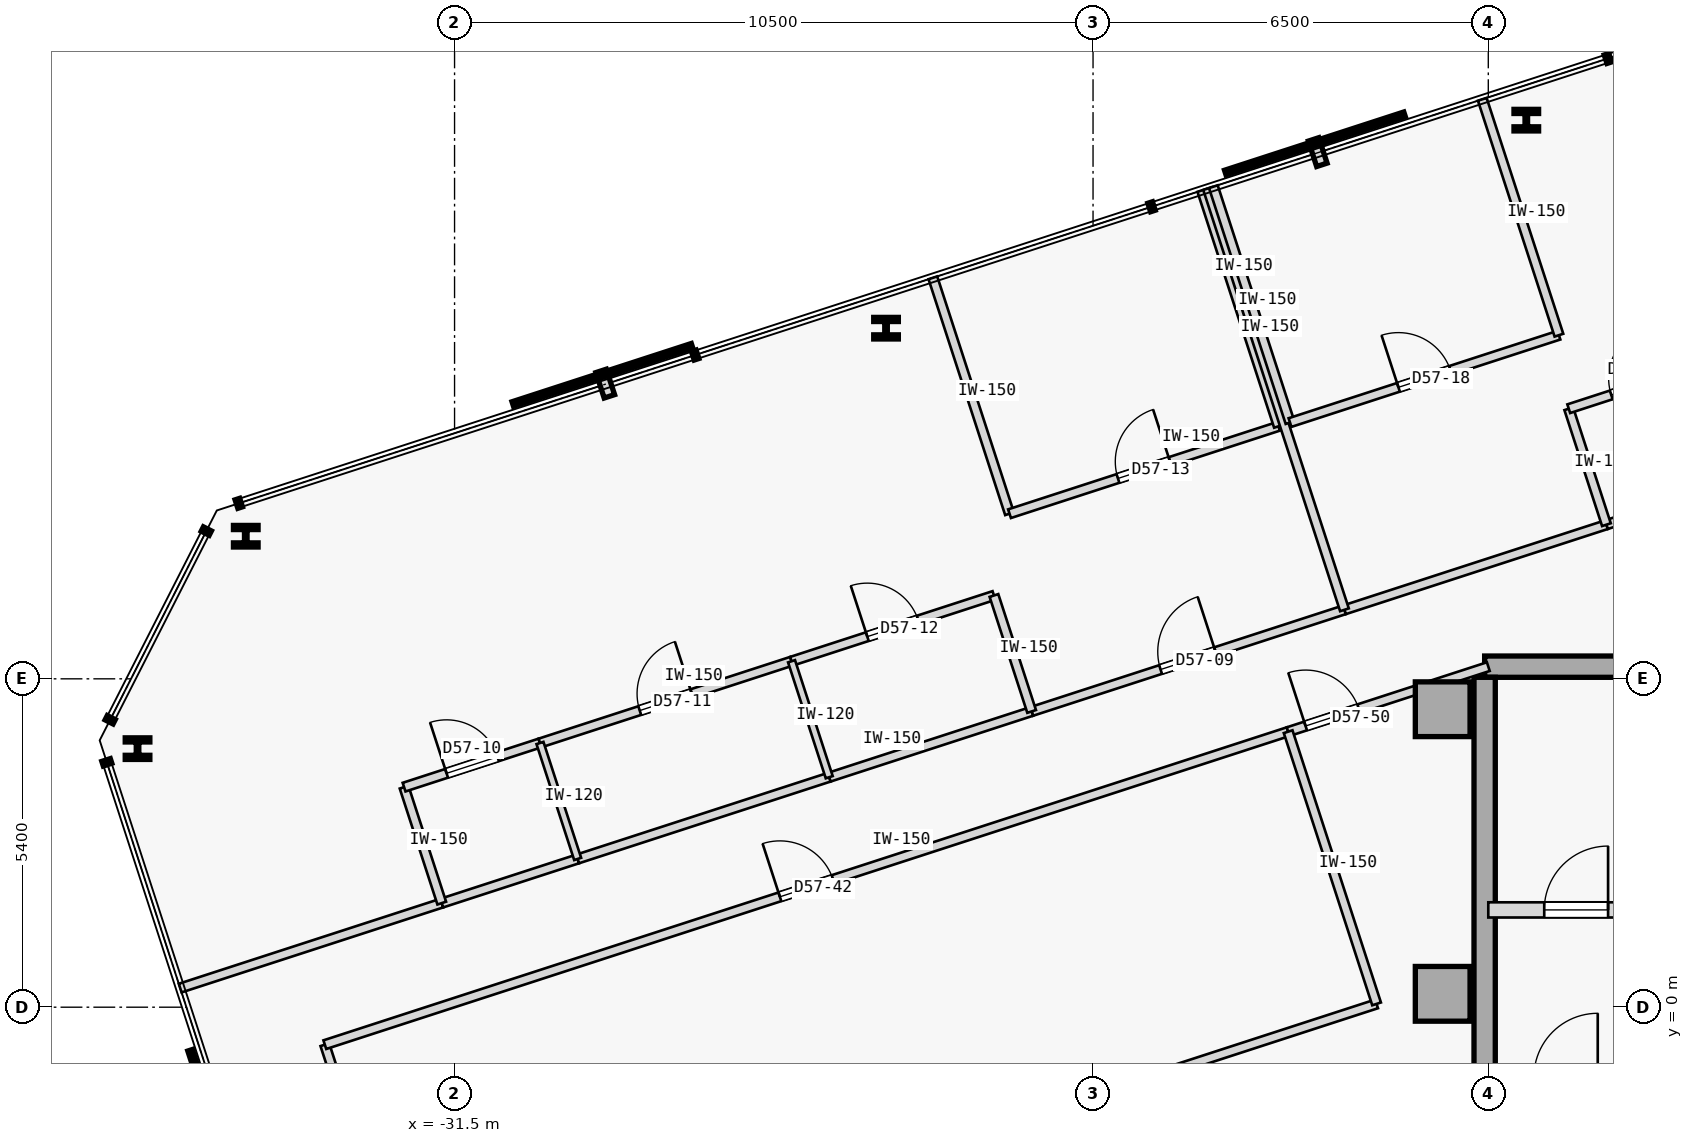
"""IFC4 building model, lengths in metres.
Left out: names, types, materials, properties, quantities, classifications, styles, units other than length and angle.
Written with IfcOpenShell. Run it as: python <this file> out.ifc"""

import sys

from ifc_helpers import new_model, si_unit, direction, frame, frame_2d, origin, origin_2d, place, context, subcontext, project, spatial, rectangle, i_section, extrude, element, fill, save


model = new_model("IFC4")
c1 = context("Model", 3, precision=1e-05, world=origin(), true_north=direction((0.0, 1.0)))
c2 = subcontext(c1, "Body", "Model", "MODEL_VIEW")
j1 = project(units=[si_unit("LENGTHUNIT", "METRE"), si_unit("PLANEANGLEUNIT", "RADIAN")], contexts=[c1])
p1 = place(None, origin())
s1 = spatial("IfcSite", under=j1, at=p1, CompositionType="ELEMENT")
p2 = place(p1, origin())
s2 = spatial("IfcBuilding", under=s1, at=p2, CompositionType="ELEMENT")
p3 = place(p2, frame((0.0, 0.0, 217.6)))
s3 = spatial("IfcBuildingStorey", under=s2, at=p3, CompositionType="ELEMENT", Elevation=217.6)
for number, where, z_axis, x_axis in (
    (1, (-15.25, 4.9, 0.0), (0.0, 0.0, 1.0), (1.0, 0.0, 0.0)),
    (2, (-15.25, 0.22, 0.0), (0.0, 0.0, 1.0), (1.0, 0.0, 0.0)),
):
    element("IfcColumn", number, at=place(p3, frame(where, z_axis=z_axis, x_axis=x_axis)), inside=s3, PredefinedType="COLUMN", context=c2, shape_type="SweptSolid", body=[
        extrude(rectangle(XDim=0.9, YDim=0.9, at=origin_2d()), origin(), (0.0, 0.0, 1.0), 3.35),
    ])
p4 = place(p3, frame((-14.56, 5.6, 0.0), z_axis=(0.0, 0.0, 1.0), x_axis=(1.0, 0.0, 0.0)))
e3 = element("IfcWall", 3, at=p4, inside=s3, PredefinedType="SHEAR", context=c2, shape_type="SweptSolid", body=[
    extrude(rectangle(XDim=11.41, YDim=0.35, at=frame_2d((5.705, 0.0))), origin(), (0.0, 0.0, 1.0), 3.125),
])
p5 = place(p3, frame((-14.56, -5.425, 0.0), z_axis=(0.0, 0.0, 1.0), x_axis=(0.0, 1.0, 0.0)))
e4 = element("IfcWall", 4, at=p5, inside=s3, PredefinedType="SHEAR", context=c2, shape_type="SweptSolid", body=[
    extrude(rectangle(XDim=10.85, YDim=0.35, at=frame_2d((5.425, 0.0))), origin(), (0.0, 0.0, 1.0), 3.125),
])
for number, where, z_axis, x_axis in (
    (5, (-13.875, 14.587, 0.0), (0.0, 0.0, 1.0), (1.0, 0.0, 0.0)),
    (6, (-24.404, 11.166, 0.0), (0.0, 0.0, 1.0), (1.0, 0.0, 0.0)),
    (7, (-34.934, 7.745, 0.0), (0.0, 0.0, 1.0), (1.0, 0.0, 0.0)),
    (8, (-36.713, 4.252, 0.0), (0.0, 0.0, 1.0), (1.0, 0.0, 0.0)),
):
    element("IfcColumn", number, at=place(p3, frame(where, z_axis=z_axis, x_axis=x_axis)), inside=s3, PredefinedType="COLUMN", context=c2, shape_type="SweptSolid", body=[
        extrude(i_section(OverallWidth=0.405, OverallDepth=0.355, WebThickness=0.042, FlangeThickness=0.068, FilletRadius=0.015, at=origin_2d()), origin(), (0.0, 0.0, 1.0), 3.35),
    ])
p6 = place(p3, frame((-14.5, 1.6, 0.0), z_axis=(0.0, 0.0, 1.0), x_axis=(1.0, 0.0, 0.0)))
e9 = element("IfcWall", 9, at=p6, inside=s3, PredefinedType="STANDARD", context=c2, shape_type="SweptSolid", body=[
    extrude(rectangle(XDim=3.6, YDim=0.25, at=frame_2d((1.8, 0.0))), origin(), (0.0, 0.0, 1.0), 3.125),
])
p7 = place(p6, frame((0.92, 0.0, 0.0)))
e10 = element("IfcOpeningElement", 10, at=p7, cuts=e9, PredefinedType="OPENING", context=c2, shape_type="SweptSolid", body=[
    extrude(rectangle(XDim=1.05, YDim=2.15, at=frame_2d((0.525, 1.075))), frame((0.0, 0.135, 0.0), z_axis=(0.0, -1.0, 0.0), x_axis=(1.0, 0.0, 0.0)), (0.0, 0.0, 1.0), 0.27),
])
p8 = place(p3, frame((-36.012, 0.314, 0.0), z_axis=(0.0, 0.0, 1.0), x_axis=(0.951052710898, 0.309028705936, 0.0)))
e11 = element("IfcWall", 11, at=p8, inside=s3, PredefinedType="PARTITIONING", context=c2, shape_type="SweptSolid", body=[
    extrude(rectangle(XDim=4.523, YDim=0.15, at=frame_2d((2.261, 0.0))), origin(), (0.0, 0.0, 1.0), 3.125),
])
p9 = place(p3, frame((-22.01, 4.864, 0.0), z_axis=(0.0, 0.0, 1.0), x_axis=(0.951061595649, 0.309001361293, 0.0)))
e12 = element("IfcWall", 12, at=p9, inside=s3, PredefinedType="PARTITIONING", context=c2, shape_type="SweptSolid", body=[
    extrude(rectangle(XDim=5.409, YDim=0.15, at=frame_2d((2.705, 0.0))), origin(), (0.0, 0.0, 1.0), 3.125),
])
p10 = place(p9, frame((2.229, 0.0, 0.0)))
e13 = element("IfcOpeningElement", 13, at=p10, cuts=e12, PredefinedType="OPENING", context=c2, shape_type="SweptSolid", body=[
    extrude(rectangle(XDim=0.95, YDim=2.15, at=frame_2d((0.475, 1.075))), frame((0.0, 0.085, 0.0), z_axis=(0.0, -1.0, 0.0), x_axis=(1.0, 0.0, 0.0)), (0.0, 0.0, 1.0), 0.17),
])
p11 = place(p3, frame((-31.711, 1.712, 0.0), z_axis=(0.0, 0.0, 1.0), x_axis=(0.951076048914, 0.308956872689, 0.0)))
e14 = element("IfcWall", 14, at=p11, inside=s3, PredefinedType="PARTITIONING", context=c2, shape_type="SweptSolid", body=[
    extrude(rectangle(XDim=2.35, YDim=0.15, at=frame_2d((1.175, 0.0))), origin(), (0.0, 0.0, 1.0), 3.125),
])
p12 = place(p3, frame((-29.476, 2.438, 0.0), z_axis=(0.0, 0.0, 1.0), x_axis=(0.951057987102, 0.309012467661, 0.0)))
e15 = element("IfcWall", 15, at=p12, inside=s3, PredefinedType="PARTITIONING", context=c2, shape_type="SweptSolid", body=[
    extrude(rectangle(XDim=4.35, YDim=0.15, at=frame_2d((2.175, 0.0))), origin(), (0.0, 0.0, 1.0), 3.125),
])
p13 = place(p3, frame((-25.338, 3.782, 0.0), z_axis=(0.0, 0.0, 1.0), x_axis=(0.951055596592, 0.309019824916, 0.0)))
e16 = element("IfcWall", 16, at=p13, inside=s3, PredefinedType="PARTITIONING", context=c2, shape_type="SweptSolid", body=[
    extrude(rectangle(XDim=3.5, YDim=0.15, at=frame_2d((1.75, 0.0))), origin(), (0.0, 0.0, 1.0), 3.125),
])
p14 = place(p3, frame((-16.865, 6.535, 0.0), z_axis=(0.0, 0.0, 1.0), x_axis=(0.951049118272, 0.309039762222, 0.0)))
e17 = element("IfcWall", 17, at=p14, inside=s3, PredefinedType="PARTITIONING", context=c2, shape_type="SweptSolid", body=[
    extrude(rectangle(XDim=4.53, YDim=0.15, at=frame_2d((2.265, 0.0))), origin(), (0.0, 0.0, 1.0), 3.125),
])
p15 = place(p3, frame((-12.557, 7.935, 0.0), z_axis=(0.0, 0.0, 1.0), x_axis=(0.951045519245, 0.309050837767, 0.0)))
e18 = element("IfcWall", 18, at=p15, inside=s3, PredefinedType="PARTITIONING", context=c2, shape_type="SweptSolid", body=[
    extrude(rectangle(XDim=2.35, YDim=0.15, at=frame_2d((1.175, 0.0))), origin(), (0.0, 0.0, 1.0), 3.125),
])
p16 = place(p3, frame((-32.179, -5.093, 0.0), z_axis=(0.0, 0.0, 1.0), x_axis=(-0.309014532869, 0.951057316083, 0.0)))
e19 = element("IfcWall", 19, at=p16, inside=s3, PredefinedType="PARTITIONING", context=c2, shape_type="SweptSolid", body=[
    extrude(rectangle(XDim=4.707, YDim=0.15, at=frame_2d((2.354, 0.0))), origin(), (0.0, 0.0, 1.0), 3.125),
])
p17 = place(p3, frame((-33.633, -0.616, 0.0), z_axis=(0.0, 0.0, 1.0), x_axis=(0.951058192995, 0.309011833974, 0.0)))
e20 = element("IfcWall", 20, at=p17, inside=s3, PredefinedType="PARTITIONING", context=c2, shape_type="SweptSolid", body=[
    extrude(rectangle(XDim=16.657, YDim=0.15, at=frame_2d((8.329, 0.0))), origin(), (0.0, 0.0, 1.0), 3.125),
])
p18 = place(p17, frame((7.868, 0.0, 0.0)))
e21 = element("IfcOpeningElement", 21, at=p18, cuts=e20, PredefinedType="OPENING", context=c2, shape_type="SweptSolid", body=[
    extrude(rectangle(XDim=0.92, YDim=2.15, at=frame_2d((0.46, 1.075))), frame((0.0, 0.085, 0.0), z_axis=(0.0, -1.0, 0.0), x_axis=(1.0, 0.0, 0.0)), (0.0, 0.0, 1.0), 0.17),
])
p19 = place(p3, frame((-17.792, 4.531, 0.0), z_axis=(0.0, 0.0, 1.0), x_axis=(0.951047546178, 0.309044600193, 0.0)))
e22 = element("IfcWall", 22, at=p19, inside=s3, PredefinedType="PARTITIONING", context=c2, shape_type="SweptSolid", body=[
    extrude(rectangle(XDim=3.461, YDim=0.15, at=frame_2d((1.73, 0.0))), origin(), (0.0, 0.0, 1.0), 3.125),
])
p20 = place(p19, frame((0.302, 0.0, 0.0)))
e23 = element("IfcOpeningElement", 23, at=p20, cuts=e22, PredefinedType="OPENING", context=c2, shape_type="SweptSolid", body=[
    extrude(rectangle(XDim=0.92, YDim=2.15, at=frame_2d((0.46, 1.075))), frame((0.0, 0.085, 0.0), z_axis=(0.0, -1.0, 0.0), x_axis=(1.0, 0.0, 0.0)), (0.0, 0.0, 1.0), 0.17),
])
p21 = place(p3, frame((-31.711, 1.712, 0.0), z_axis=(0.0, 0.0, 1.0), x_axis=(-0.308948390121, 0.951078804433, 0.0)))
e24 = element("IfcWall", 24, at=p21, inside=s3, PredefinedType="PARTITIONING", context=c2, shape_type="SweptSolid", body=[
    extrude(rectangle(XDim=2.005, YDim=0.15, at=frame_2d((1.002, 0.0))), origin(), (0.0, 0.0, 1.0), 3.125),
])
p22 = place(p3, frame((-32.33, 3.619, 0.0), z_axis=(0.0, 0.0, 1.0), x_axis=(0.951066131077, 0.308987401554, 0.0)))
e25 = element("IfcWall", 25, at=p22, inside=s3, PredefinedType="PARTITIONING", context=c2, shape_type="SweptSolid", body=[
    extrude(rectangle(XDim=2.35, YDim=0.15, at=frame_2d((1.175, 0.0))), origin(), (0.0, 0.0, 1.0), 3.125),
])
p23 = place(p22, frame((0.735, 0.0, 0.0)))
e26 = element("IfcOpeningElement", 26, at=p23, cuts=e25, PredefinedType="OPENING", context=c2, shape_type="SweptSolid", body=[
    extrude(rectangle(XDim=0.88, YDim=2.15, at=frame_2d((0.44, 1.075))), frame((0.0, 0.085, 0.0), z_axis=(0.0, -1.0, 0.0), x_axis=(1.0, 0.0, 0.0)), (0.0, 0.0, 1.0), 0.17),
])
p24 = place(p3, frame((-30.095, 4.345, 0.0), z_axis=(0.0, 0.0, 1.0), x_axis=(0.951041492154, 0.309063230101, 0.0)))
e27 = element("IfcWall", 27, at=p24, inside=s3, PredefinedType="PARTITIONING", context=c2, shape_type="SweptSolid", body=[
    extrude(rectangle(XDim=4.35, YDim=0.15, at=frame_2d((2.175, 0.0))), origin(), (0.0, 0.0, 1.0), 3.125),
])
p25 = place(p24, frame((1.725, 0.0, 0.0)))
e28 = element("IfcOpeningElement", 28, at=p25, cuts=e27, PredefinedType="OPENING", context=c2, shape_type="SweptSolid", body=[
    extrude(rectangle(XDim=0.9, YDim=2.15, at=frame_2d((0.45, 1.075))), frame((0.0, 0.085, 0.0), z_axis=(0.0, -1.0, 0.0), x_axis=(1.0, 0.0, 0.0)), (0.0, 0.0, 1.0), 0.17),
])
p26 = place(p3, frame((-25.958, 5.689, 0.0), z_axis=(0.0, 0.0, 1.0), x_axis=(0.951076095932, 0.308956727951, 0.0)))
e29 = element("IfcWall", 29, at=p26, inside=s3, PredefinedType="PARTITIONING", context=c2, shape_type="SweptSolid", body=[
    extrude(rectangle(XDim=3.5, YDim=0.15, at=frame_2d((1.75, 0.0))), origin(), (0.0, 0.0, 1.0), 3.125),
])
p27 = place(p26, frame((1.31, 0.0, 0.0)))
e30 = element("IfcOpeningElement", 30, at=p27, cuts=e29, PredefinedType="OPENING", context=c2, shape_type="SweptSolid", body=[
    extrude(rectangle(XDim=0.88, YDim=2.15, at=frame_2d((0.44, 1.075))), frame((0.0, 0.085, 0.0), z_axis=(0.0, -1.0, 0.0), x_axis=(1.0, 0.0, 0.0)), (0.0, 0.0, 1.0), 0.17),
])
p28 = place(p3, frame((-22.01, 4.864, 0.0), z_axis=(0.0, 0.0, 1.0), x_axis=(-0.309058537449, 0.951043017129, 0.0)))
e31 = element("IfcWall", 31, at=p28, inside=s3, PredefinedType="PARTITIONING", context=c2, shape_type="SweptSolid", body=[
    extrude(rectangle(XDim=2.005, YDim=0.15, at=frame_2d((1.002, 0.0))), origin(), (0.0, 0.0, 1.0), 3.125),
])
p29 = place(p3, frame((-22.374, 8.115, 0.0), z_axis=(0.0, 0.0, 1.0), x_axis=(-0.308964264858, 0.951073647538, 0.0)))
e32 = element("IfcWall", 32, at=p29, inside=s3, PredefinedType="PARTITIONING", context=c2, shape_type="SweptSolid", body=[
    extrude(rectangle(XDim=4.079, YDim=0.15, at=frame_2d((2.04, 0.0))), origin(), (0.0, 0.0, 1.0), 3.125),
])
p30 = place(p3, frame((-22.374, 8.115, 0.0), z_axis=(0.0, 0.0, 1.0), x_axis=(0.951055286502, 0.309020779263, 0.0)))
e33 = element("IfcWall", 33, at=p30, inside=s3, PredefinedType="PARTITIONING", context=c2, shape_type="SweptSolid", body=[
    extrude(rectangle(XDim=4.65, YDim=0.15, at=frame_2d((2.325, 0.0))), origin(), (0.0, 0.0, 1.0), 3.125),
])
p31 = place(p30, frame((1.875, 0.0, 0.0)))
e34 = element("IfcOpeningElement", 34, at=p31, cuts=e33, PredefinedType="OPENING", context=c2, shape_type="SweptSolid", body=[
    extrude(rectangle(XDim=0.9, YDim=2.15, at=frame_2d((0.45, 1.075))), frame((0.0, 0.085, 0.0), z_axis=(0.0, -1.0, 0.0), x_axis=(1.0, 0.0, 0.0)), (0.0, 0.0, 1.0), 0.17),
])
p32 = place(p3, frame((-17.951, 9.552, 0.0), z_axis=(0.0, 0.0, 1.0), x_axis=(-0.309018403393, 0.951056058476, 0.0)))
e35 = element("IfcWall", 35, at=p32, inside=s3, PredefinedType="PARTITIONING", context=c2, shape_type="SweptSolid", body=[
    extrude(rectangle(XDim=4.079, YDim=0.15, at=frame_2d((2.04, 0.0))), origin(), (0.0, 0.0, 1.0), 3.125),
])
p33 = place(p3, frame((-16.865, 6.535, 0.0), z_axis=(0.0, 0.0, 1.0), x_axis=(-0.309029230739, 0.951052540372, 0.0)))
e36 = element("IfcWall", 36, at=p33, inside=s3, PredefinedType="PARTITIONING", context=c2, shape_type="SweptSolid", body=[
    extrude(rectangle(XDim=7.284, YDim=0.15, at=frame_2d((3.642, 0.0))), origin(), (0.0, 0.0, 1.0), 3.125),
])
p34 = place(p3, frame((-29.476, 2.438, 0.0), z_axis=(0.0, 0.0, 1.0), x_axis=(-0.309058537449, 0.951043017129, 0.0)))
e37 = element("IfcWall", 37, at=p34, inside=s3, PredefinedType="PARTITIONING", context=c2, shape_type="SweptSolid", body=[
    extrude(rectangle(XDim=2.005, YDim=0.12, at=frame_2d((1.002, 0.0))), origin(), (0.0, 0.0, 1.0), 3.125),
])
p35 = place(p3, frame((-25.338, 3.782, 0.0), z_axis=(0.0, 0.0, 1.0), x_axis=(-0.309022749039, 0.951054646472, 0.0)))
e38 = element("IfcWall", 38, at=p35, inside=s3, PredefinedType="PARTITIONING", context=c2, shape_type="SweptSolid", body=[
    extrude(rectangle(XDim=2.005, YDim=0.12, at=frame_2d((1.002, 0.0))), origin(), (0.0, 0.0, 1.0), 3.125),
])
p36 = place(p3, frame((-12.557, 7.935, 0.0), z_axis=(0.0, 0.0, 1.0), x_axis=(-0.308912611775, 0.951090425925, 0.0)))
e39 = element("IfcWall", 39, at=p36, inside=s3, PredefinedType="PARTITIONING", context=c2, shape_type="SweptSolid", body=[
    extrude(rectangle(XDim=2.005, YDim=0.15, at=frame_2d((1.002, 0.0))), origin(), (0.0, 0.0, 1.0), 3.125),
])
p37 = place(p3, frame((-13.177, 9.842, 0.0), z_axis=(0.0, 0.0, 1.0), x_axis=(0.951066131077, 0.308987401554, 0.0)))
e40 = element("IfcWall", 40, at=p37, inside=s3, PredefinedType="PARTITIONING", context=c2, shape_type="SweptSolid", body=[
    extrude(rectangle(XDim=2.35, YDim=0.15, at=frame_2d((1.175, 0.0))), origin(), (0.0, 0.0, 1.0), 3.125),
])
p38 = place(p37, frame((0.735, 0.0, 0.0)))
e41 = element("IfcOpeningElement", 41, at=p38, cuts=e40, PredefinedType="OPENING", context=c2, shape_type="SweptSolid", body=[
    extrude(rectangle(XDim=0.88, YDim=2.15, at=frame_2d((0.44, 1.075))), frame((0.0, 0.085, 0.0), z_axis=(0.0, -1.0, 0.0), x_axis=(1.0, 0.0, 0.0)), (0.0, 0.0, 1.0), 0.17),
])
p39 = place(p3, frame((-17.761, 9.614, 0.0), z_axis=(0.0, 0.0, 1.0), x_axis=(-0.309018403393, 0.951056058476, 0.0)))
e42 = element("IfcWall", 42, at=p39, inside=s3, PredefinedType="PARTITIONING", context=c2, shape_type="SweptSolid", body=[
    extrude(rectangle(XDim=4.079, YDim=0.15, at=frame_2d((2.04, 0.0))), origin(), (0.0, 0.0, 1.0), 3.125),
])
p40 = place(p3, frame((-17.761, 9.614, 0.0), z_axis=(0.0, 0.0, 1.0), x_axis=(0.951050272606, 0.309036209813, 0.0)))
e43 = element("IfcWall", 43, at=p40, inside=s3, PredefinedType="PARTITIONING", context=c2, shape_type="SweptSolid", body=[
    extrude(rectangle(XDim=4.65, YDim=0.15, at=frame_2d((2.325, 0.0))), origin(), (0.0, 0.0, 1.0), 3.125),
])
p41 = place(p40, frame((1.875, 0.0, 0.0)))
e44 = element("IfcOpeningElement", 44, at=p41, cuts=e43, PredefinedType="OPENING", context=c2, shape_type="SweptSolid", body=[
    extrude(rectangle(XDim=0.9, YDim=2.15, at=frame_2d((0.45, 1.075))), frame((0.0, 0.085, 0.0), z_axis=(0.0, -1.0, 0.0), x_axis=(1.0, 0.0, 0.0)), (0.0, 0.0, 1.0), 0.17),
])
p42 = place(p3, frame((-13.338, 11.051, 0.0), z_axis=(0.0, 0.0, 1.0), x_axis=(-0.309018403393, 0.951056058476, 0.0)))
e45 = element("IfcWall", 45, at=p42, inside=s3, PredefinedType="PARTITIONING", context=c2, shape_type="SweptSolid", body=[
    extrude(rectangle(XDim=4.079, YDim=0.15, at=frame_2d((2.04, 0.0))), origin(), (0.0, 0.0, 1.0), 3.125),
])
p43 = place(p3, frame((-32.179, -5.093, 0.0), z_axis=(0.0, 0.0, 1.0), x_axis=(0.951053885426, 0.309025091239, 0.0)))
e46 = element("IfcWall", 46, at=p43, inside=s3, PredefinedType="PARTITIONING", context=c2, shape_type="SweptSolid", body=[
    extrude(rectangle(XDim=16.657, YDim=0.15, at=frame_2d((8.329, 0.0))), origin(), (0.0, 0.0, 1.0), 3.125),
])
p44 = place(p3, frame((-16.337, 0.054, 0.0), z_axis=(0.0, 0.0, 1.0), x_axis=(-0.309029776355, 0.951052363083, 0.0)))
e47 = element("IfcWall", 47, at=p44, inside=s3, PredefinedType="PARTITIONING", context=c2, shape_type="SweptSolid", body=[
    extrude(rectangle(XDim=4.707, YDim=0.15, at=frame_2d((2.354, 0.0))), origin(), (0.0, 0.0, 1.0), 3.125),
])
p45 = place(p7, origin())
e48 = element("IfcDoor", 48, at=p45, inside=s3, OperationType="SINGLE_SWING_RIGHT", PredefinedType="DOOR", context=c2, shape_type="SweptSolid", body=[
    extrude(rectangle(XDim=1.05, YDim=2.15, at=frame_2d((0.525, 1.075))), frame((0.0, 0.025, 0.0), z_axis=(0.0, -1.0, 0.0), x_axis=(1.0, 0.0, 0.0)), (0.0, 0.0, 1.0), 0.05),
])
fill(e10, e48)
p46 = place(p10, origin())
e49 = element("IfcDoor", 49, at=p46, inside=s3, OperationType="SINGLE_SWING_RIGHT", PredefinedType="DOOR", context=c2, shape_type="SweptSolid", body=[
    extrude(rectangle(XDim=0.95, YDim=2.15, at=frame_2d((0.475, 1.075))), frame((0.0, 0.025, 0.0), z_axis=(0.0, -1.0, 0.0), x_axis=(1.0, 0.0, 0.0)), (0.0, 0.0, 1.0), 0.05),
])
fill(e13, e49)
p47 = place(p23, origin())
e50 = element("IfcDoor", 50, at=p47, inside=s3, OperationType="SINGLE_SWING_LEFT", PredefinedType="DOOR", context=c2, shape_type="SweptSolid", body=[
    extrude(rectangle(XDim=0.88, YDim=2.15, at=frame_2d((0.44, 1.075))), frame((0.0, 0.025, 0.0), z_axis=(0.0, -1.0, 0.0), x_axis=(1.0, 0.0, 0.0)), (0.0, 0.0, 1.0), 0.05),
])
fill(e26, e50)
p48 = place(p25, origin())
e51 = element("IfcDoor", 51, at=p48, inside=s3, OperationType="SINGLE_SWING_RIGHT", PredefinedType="DOOR", context=c2, shape_type="SweptSolid", body=[
    extrude(rectangle(XDim=0.9, YDim=2.15, at=frame_2d((0.45, 1.075))), frame((0.0, 0.025, 0.0), z_axis=(0.0, -1.0, 0.0), x_axis=(1.0, 0.0, 0.0)), (0.0, 0.0, 1.0), 0.05),
])
fill(e28, e51)
p49 = place(p27, origin())
e52 = element("IfcDoor", 52, at=p49, inside=s3, OperationType="SINGLE_SWING_LEFT", PredefinedType="DOOR", context=c2, shape_type="SweptSolid", body=[
    extrude(rectangle(XDim=0.88, YDim=2.15, at=frame_2d((0.44, 1.075))), frame((0.0, 0.025, 0.0), z_axis=(0.0, -1.0, 0.0), x_axis=(1.0, 0.0, 0.0)), (0.0, 0.0, 1.0), 0.05),
])
fill(e30, e52)
p50 = place(p31, origin())
e53 = element("IfcDoor", 53, at=p50, inside=s3, OperationType="SINGLE_SWING_RIGHT", PredefinedType="DOOR", context=c2, shape_type="SweptSolid", body=[
    extrude(rectangle(XDim=0.9, YDim=2.15, at=frame_2d((0.45, 1.075))), frame((0.0, 0.025, 0.0), z_axis=(0.0, -1.0, 0.0), x_axis=(1.0, 0.0, 0.0)), (0.0, 0.0, 1.0), 0.05),
])
fill(e34, e53)
p51 = place(p38, origin())
e54 = element("IfcDoor", 54, at=p51, inside=s3, OperationType="SINGLE_SWING_RIGHT", PredefinedType="DOOR", context=c2, shape_type="SweptSolid", body=[
    extrude(rectangle(XDim=0.88, YDim=2.15, at=frame_2d((0.44, 1.075))), frame((0.0, 0.025, 0.0), z_axis=(0.0, -1.0, 0.0), x_axis=(1.0, 0.0, 0.0)), (0.0, 0.0, 1.0), 0.05),
])
fill(e41, e54)
p52 = place(p41, origin())
e55 = element("IfcDoor", 55, at=p52, inside=s3, OperationType="SINGLE_SWING_LEFT", PredefinedType="DOOR", context=c2, shape_type="SweptSolid", body=[
    extrude(rectangle(XDim=0.9, YDim=2.15, at=frame_2d((0.45, 1.075))), frame((0.0, 0.025, 0.0), z_axis=(0.0, -1.0, 0.0), x_axis=(1.0, 0.0, 0.0)), (0.0, 0.0, 1.0), 0.05),
])
fill(e44, e55)
p53 = place(p18, origin())
e56 = element("IfcDoor", 56, at=p53, inside=s3, OperationType="SINGLE_SWING_LEFT", PredefinedType="DOOR", context=c2, shape_type="SweptSolid", body=[
    extrude(rectangle(XDim=0.92, YDim=2.15, at=frame_2d((0.46, 1.075))), frame((0.0, 0.025, 0.0), z_axis=(0.0, -1.0, 0.0), x_axis=(1.0, 0.0, 0.0)), (0.0, 0.0, 1.0), 0.05),
])
fill(e21, e56)
p54 = place(p20, origin())
e57 = element("IfcDoor", 57, at=p54, inside=s3, OperationType="SINGLE_SWING_LEFT", PredefinedType="DOOR", context=c2, shape_type="SweptSolid", body=[
    extrude(rectangle(XDim=0.92, YDim=2.15, at=frame_2d((0.46, 1.075))), frame((0.0, 0.025, 0.0), z_axis=(0.0, -1.0, 0.0), x_axis=(1.0, 0.0, 0.0)), (0.0, 0.0, 1.0), 0.05),
])
fill(e23, e57)
save(model, sys.argv[1])
